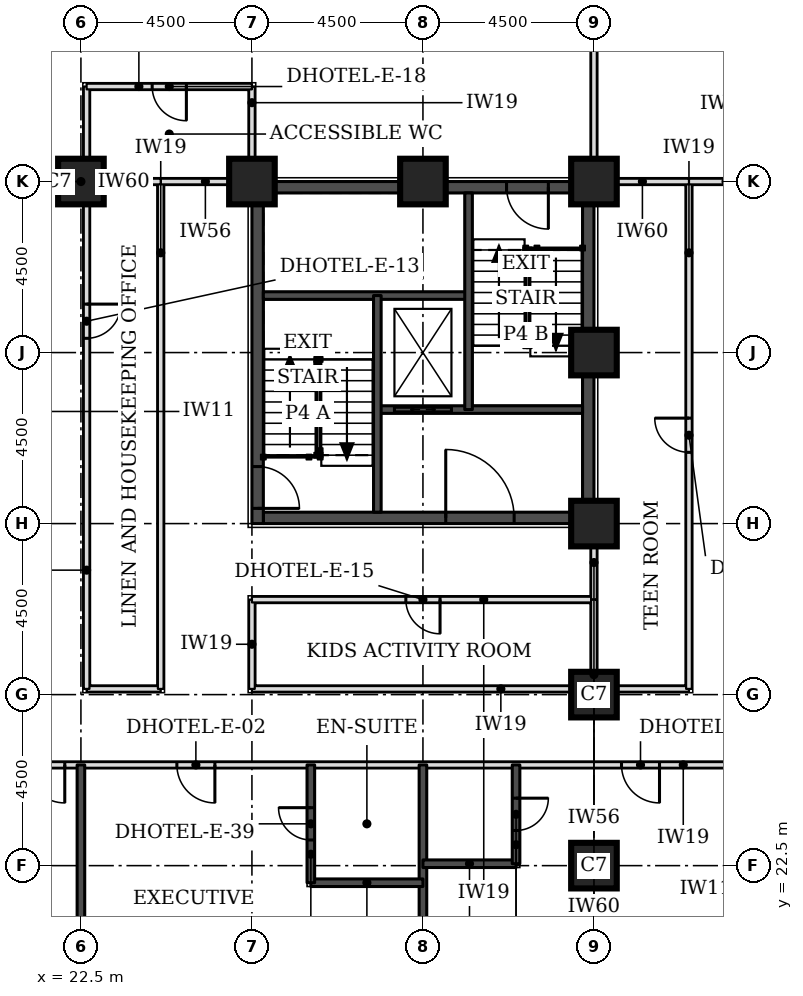
"""IFC4 building model, lengths in metres.
Left out: names, types, materials, properties, quantities, classifications, styles, units other than length and angle.
Written with IfcOpenShell. Run it as: python <this file> out.ifc"""

import sys

from ifc_helpers import new_model, si_unit, direction, frame, frame_2d, origin, origin_2d, place, context, subcontext, project, spatial, rectangle, extrude, element, fill, save


model = new_model("IFC4")
c1 = context("Model", 3, precision=1e-05, world=origin(), true_north=direction((0.0, 1.0)))
c2 = subcontext(c1, "Body", "Model", "MODEL_VIEW")
j1 = project(units=[si_unit("LENGTHUNIT", "METRE"), si_unit("PLANEANGLEUNIT", "RADIAN")], contexts=[c1])
p1 = place(None, origin())
s1 = spatial("IfcSite", under=j1, at=p1, CompositionType="ELEMENT")
p2 = place(p1, origin())
s2 = spatial("IfcBuilding", under=s1, at=p2, CompositionType="ELEMENT")
p3 = place(p2, frame((0.0, 0.0, 62.7)))
s3 = spatial("IfcBuildingStorey", under=s2, at=p3, CompositionType="ELEMENT", Elevation=62.7)
for number, where, z_axis, x_axis in (
    (1, (36.0, 22.5, 0.0), (0.0, 0.0, 1.0), (1.0, 0.0, 0.0)),
    (2, (36.0, 27.0, 0.0), (0.0, 0.0, 1.0), (1.0, 0.0, 0.0)),
    (3, (36.0, 31.5, 0.0), (0.0, 0.0, 1.0), (1.0, 0.0, 0.0)),
    (4, (36.0, 36.0, 0.0), (0.0, 0.0, 1.0), (1.0, 0.0, 0.0)),
    (5, (22.5, 40.5, 0.0), (0.0, 0.0, 1.0), (1.0, 0.0, 0.0)),
    (6, (27.0, 40.5, 0.0), (0.0, 0.0, 1.0), (1.0, 0.0, 0.0)),
    (7, (31.5, 40.5, 0.0), (0.0, 0.0, 1.0), (1.0, 0.0, 0.0)),
    (8, (36.0, 40.5, 0.0), (0.0, 0.0, 1.0), (1.0, 0.0, 0.0)),
):
    element("IfcColumn", number, at=place(p3, frame(where, z_axis=z_axis, x_axis=x_axis)), inside=s3, PredefinedType="COLUMN", context=c2, shape_type="SweptSolid", body=[
        extrude(rectangle(XDim=1.2, YDim=1.2, at=origin_2d()), origin(), (0.0, 0.0, 1.0), 3.3),
    ])
p4 = place(p3, frame((27.3, 31.65, 0.0), z_axis=(0.0, 0.0, 1.0), x_axis=(1.0, 0.0, 0.0)))
e9 = element("IfcWall", 9, at=p4, inside=s3, PredefinedType="SHEAR", context=c2, shape_type="SweptSolid", body=[
    extrude(rectangle(XDim=8.4, YDim=0.3, at=frame_2d((4.2, 0.0))), origin(), (0.0, 0.0, 1.0), 3.3),
])
p5 = place(p4, frame((4.8, 0.0, 0.0)))
e10 = element("IfcOpeningElement", 10, at=p5, cuts=e9, PredefinedType="OPENING", context=c2, shape_type="SweptSolid", body=[
    extrude(rectangle(XDim=1.8, YDim=2.1, at=frame_2d((0.9, 1.05))), frame((0.0, 0.16, 0.0), z_axis=(0.0, -1.0, 0.0), x_axis=(1.0, 0.0, 0.0)), (0.0, 0.0, 1.0), 0.32),
])
p6 = place(p3, frame((27.3, 40.35, 0.0), z_axis=(0.0, 0.0, 1.0), x_axis=(1.0, 0.0, 0.0)))
e11 = element("IfcWall", 11, at=p6, inside=s3, PredefinedType="SHEAR", context=c2, shape_type="SweptSolid", body=[
    extrude(rectangle(XDim=8.4, YDim=0.3, at=frame_2d((4.2, 0.0))), origin(), (0.0, 0.0, 1.0), 3.3),
])
p7 = place(p6, frame((6.4, 0.0, 0.0)))
e12 = element("IfcOpeningElement", 12, at=p7, cuts=e11, PredefinedType="OPENING", context=c2, shape_type="SweptSolid", body=[
    extrude(rectangle(XDim=1.1, YDim=2.1, at=frame_2d((0.55, 1.05))), frame((0.0, 0.16, 0.0), z_axis=(0.0, -1.0, 0.0), x_axis=(1.0, 0.0, 0.0)), (0.0, 0.0, 1.0), 0.32),
])
p8 = place(p3, frame((27.15, 31.5, 0.0), z_axis=(0.0, 0.0, 1.0), x_axis=(0.0, 1.0, 0.0)))
e13 = element("IfcWall", 13, at=p8, inside=s3, PredefinedType="SHEAR", context=c2, shape_type="SweptSolid", body=[
    extrude(rectangle(XDim=9.0, YDim=0.3, at=frame_2d((4.5, 0.0))), origin(), (0.0, 0.0, 1.0), 3.3),
])
p9 = place(p8, frame((0.4, 0.0, 0.0)))
e14 = element("IfcOpeningElement", 14, at=p9, cuts=e13, PredefinedType="OPENING", context=c2, shape_type="SweptSolid", body=[
    extrude(rectangle(XDim=1.1, YDim=2.1, at=frame_2d((0.55, 1.05))), frame((0.0, 0.16, 0.0), z_axis=(0.0, -1.0, 0.0), x_axis=(1.0, 0.0, 0.0)), (0.0, 0.0, 1.0), 0.32),
])
p10 = place(p3, frame((35.85, 31.5, 0.0), z_axis=(0.0, 0.0, 1.0), x_axis=(0.0, 1.0, 0.0)))
e15 = element("IfcWall", 15, at=p10, inside=s3, PredefinedType="SHEAR", context=c2, shape_type="SweptSolid", body=[
    extrude(rectangle(XDim=9.0, YDim=0.3, at=frame_2d((4.5, 0.0))), origin(), (0.0, 0.0, 1.0), 3.3),
])
p11 = place(p3, frame((20.65, 25.15, 0.0), z_axis=(0.0, 0.0, 1.0), x_axis=(1.0, 0.0, 0.0)))
e16 = element("IfcWall", 16, at=p11, inside=s3, PredefinedType="PARTITIONING", context=c2, shape_type="SweptSolid", body=[
    extrude(rectangle(XDim=32.2, YDim=0.15, at=frame_2d((16.1, 0.0))), origin(), (0.0, 0.0, 1.0), 3.08),
])
p12 = place(p11, frame((4.375, 0.0, 0.0)))
e17 = element("IfcOpeningElement", 17, at=p12, cuts=e16, PredefinedType="OPENING", context=c2, shape_type="SweptSolid", body=[
    extrude(rectangle(XDim=1.0, YDim=2.1, at=frame_2d((0.5, 1.05))), frame((0.0, 0.085, 0.0), z_axis=(0.0, -1.0, 0.0), x_axis=(1.0, 0.0, 0.0)), (0.0, 0.0, 1.0), 0.17),
])
p13 = place(p11, frame((16.075, 0.0, 0.0)))
e18 = element("IfcOpeningElement", 18, at=p13, cuts=e16, PredefinedType="OPENING", context=c2, shape_type="SweptSolid", body=[
    extrude(rectangle(XDim=1.0, YDim=2.1, at=frame_2d((0.5, 1.05))), frame((0.0, 0.085, 0.0), z_axis=(0.0, -1.0, 0.0), x_axis=(1.0, 0.0, 0.0)), (0.0, 0.0, 1.0), 0.17),
])
p14 = place(p11, frame((22.375, 0.0, 0.0)))
e19 = element("IfcOpeningElement", 19, at=p14, cuts=e16, PredefinedType="OPENING", context=c2, shape_type="SweptSolid", body=[
    extrude(rectangle(XDim=1.0, YDim=2.1, at=frame_2d((0.5, 1.05))), frame((0.0, 0.085, 0.0), z_axis=(0.0, -1.0, 0.0), x_axis=(1.0, 0.0, 0.0)), (0.0, 0.0, 1.0), 0.17),
])
p15 = place(p11, frame((0.425, 0.0, 0.0)))
e20 = element("IfcOpeningElement", 20, at=p15, cuts=e16, PredefinedType="OPENING", context=c2, shape_type="SweptSolid", body=[
    extrude(rectangle(XDim=1.0, YDim=2.1, at=frame_2d((0.5, 1.05))), frame((0.0, 0.085, 0.0), z_axis=(0.0, -1.0, 0.0), x_axis=(1.0, 0.0, 0.0)), (0.0, 0.0, 1.0), 0.17),
])
p16 = place(p11, frame((30.025, 0.0, 0.0)))
e21 = element("IfcOpeningElement", 21, at=p16, cuts=e16, PredefinedType="OPENING", context=c2, shape_type="SweptSolid", body=[
    extrude(rectangle(XDim=1.0, YDim=2.1, at=frame_2d((0.5, 1.05))), frame((0.0, 0.085, 0.0), z_axis=(0.0, -1.0, 0.0), x_axis=(1.0, 0.0, 0.0)), (0.0, 0.0, 1.0), 0.17),
])
p17 = place(p3, frame((22.65, 27.15, 0.0), z_axis=(0.0, 0.0, 1.0), x_axis=(1.0, 0.0, 0.0)))
e22 = element("IfcWall", 22, at=p17, inside=s3, PredefinedType="PARTITIONING", context=c2, shape_type="SweptSolid", body=[
    extrude(rectangle(XDim=1.95, YDim=0.15, at=frame_2d((0.975, 0.0))), origin(), (0.0, 0.0, 1.0), 3.08),
])
p18 = place(p3, frame((22.65, 27.15, 0.0), z_axis=(0.0, 0.0, 1.0), x_axis=(0.0, 1.0, 0.0)))
e23 = element("IfcWall", 23, at=p18, inside=s3, PredefinedType="PARTITIONING", context=c2, shape_type="SweptSolid", body=[
    extrude(rectangle(XDim=15.85, YDim=0.15, at=frame_2d((7.925, 0.0))), origin(), (0.0, 0.0, 1.0), 3.08),
])
p19 = place(p18, frame((9.225, 0.0, 0.0)))
e24 = element("IfcOpeningElement", 24, at=p19, cuts=e23, PredefinedType="OPENING", context=c2, shape_type="SweptSolid", body=[
    extrude(rectangle(XDim=0.9, YDim=2.1, at=frame_2d((0.45, 1.05))), frame((0.0, 0.085, 0.0), z_axis=(0.0, -1.0, 0.0), x_axis=(1.0, 0.0, 0.0)), (0.0, 0.0, 1.0), 0.17),
])
p20 = place(p3, frame((24.6, 27.15, 0.0), z_axis=(0.0, 0.0, 1.0), x_axis=(0.0, 1.0, 0.0)))
e25 = element("IfcWall", 25, at=p20, inside=s3, PredefinedType="PARTITIONING", context=c2, shape_type="SweptSolid", body=[
    extrude(rectangle(XDim=13.35, YDim=0.15, at=frame_2d((6.675, 0.0))), origin(), (0.0, 0.0, 1.0), 3.08),
])
p21 = place(p3, frame((27.0, 27.15, 0.0), z_axis=(0.0, 0.0, 1.0), x_axis=(1.0, 0.0, 0.0)))
e26 = element("IfcWall", 26, at=p21, inside=s3, PredefinedType="PARTITIONING", context=c2, shape_type="SweptSolid", body=[
    extrude(rectangle(XDim=11.5, YDim=0.15, at=frame_2d((5.75, 0.0))), origin(), (0.0, 0.0, 1.0), 3.08),
])
p22 = place(p3, frame((27.0, 27.15, 0.0), z_axis=(0.0, 0.0, 1.0), x_axis=(0.0, 1.0, 0.0)))
e27 = element("IfcWall", 27, at=p22, inside=s3, PredefinedType="PARTITIONING", context=c2, shape_type="SweptSolid", body=[
    extrude(rectangle(XDim=2.35, YDim=0.15, at=frame_2d((1.175, 0.0))), origin(), (0.0, 0.0, 1.0), 3.08),
])
p23 = place(p3, frame((38.5, 27.15, 0.0), z_axis=(0.0, 0.0, 1.0), x_axis=(0.0, 1.0, 0.0)))
e28 = element("IfcWall", 28, at=p23, inside=s3, PredefinedType="PARTITIONING", context=c2, shape_type="SweptSolid", body=[
    extrude(rectangle(XDim=13.35, YDim=0.15, at=frame_2d((6.675, 0.0))), origin(), (0.0, 0.0, 1.0), 3.08),
])
p24 = place(p23, frame((6.225, 0.0, 0.0)))
e29 = element("IfcOpeningElement", 29, at=p24, cuts=e28, PredefinedType="OPENING", context=c2, shape_type="SweptSolid", body=[
    extrude(rectangle(XDim=0.9, YDim=2.1, at=frame_2d((0.45, 1.05))), frame((0.0, 0.085, 0.0), z_axis=(0.0, -1.0, 0.0), x_axis=(1.0, 0.0, 0.0)), (0.0, 0.0, 1.0), 0.17),
])
p25 = place(p3, frame((27.0, 29.5, 0.0), z_axis=(0.0, 0.0, 1.0), x_axis=(1.0, 0.0, 0.0)))
e30 = element("IfcWall", 30, at=p25, inside=s3, PredefinedType="PARTITIONING", context=c2, shape_type="SweptSolid", body=[
    extrude(rectangle(XDim=9.0, YDim=0.15, at=frame_2d((4.5, 0.0))), origin(), (0.0, 0.0, 1.0), 3.08),
])
p26 = place(p25, frame((4.05, 0.0, 0.0)))
e31 = element("IfcOpeningElement", 31, at=p26, cuts=e30, PredefinedType="OPENING", context=c2, shape_type="SweptSolid", body=[
    extrude(rectangle(XDim=0.9, YDim=2.1, at=frame_2d((0.45, 1.05))), frame((0.0, 0.085, 0.0), z_axis=(0.0, -1.0, 0.0), x_axis=(1.0, 0.0, 0.0)), (0.0, 0.0, 1.0), 0.17),
])
p27 = place(p3, frame((36.0, 29.5, 0.0), z_axis=(0.0, 0.0, 1.0), x_axis=(0.0, 1.0, 0.0)))
e32 = element("IfcWall", 32, at=p27, inside=s3, PredefinedType="PARTITIONING", context=c2, shape_type="SweptSolid", body=[
    extrude(rectangle(XDim=1.95, YDim=0.15, at=frame_2d((0.975, 0.0))), origin(), (0.0, 0.0, 1.0), 2.33),
])
p28 = place(p3, frame((24.6, 40.5, 0.0), z_axis=(0.0, 0.0, 1.0), x_axis=(1.0, 0.0, 0.0)))
e33 = element("IfcWall", 33, at=p28, inside=s3, PredefinedType="PARTITIONING", context=c2, shape_type="SweptSolid", body=[
    extrude(rectangle(XDim=2.35, YDim=0.15, at=frame_2d((1.175, 0.0))), origin(), (0.0, 0.0, 1.0), 2.33),
])
p29 = place(p3, frame((38.5, 40.5, 0.0), z_axis=(0.0, 0.0, 1.0), x_axis=(1.0, 0.0, 0.0)))
e34 = element("IfcWall", 34, at=p29, inside=s3, PredefinedType="PARTITIONING", context=c2, shape_type="SweptSolid", body=[
    extrude(rectangle(XDim=1.95, YDim=0.15, at=frame_2d((0.975, 0.0))), origin(), (0.0, 0.0, 1.0), 2.33),
])
p30 = place(p3, frame((27.0, 40.55, 0.0), z_axis=(0.0, 0.0, 1.0), x_axis=(0.0, 1.0, 0.0)))
e35 = element("IfcWall", 35, at=p30, inside=s3, PredefinedType="PARTITIONING", context=c2, shape_type="SweptSolid", body=[
    extrude(rectangle(XDim=2.45, YDim=0.15, at=frame_2d((1.225, 0.0))), origin(), (0.0, 0.0, 1.0), 3.08),
])
p31 = place(p3, frame((36.0, 40.55, 0.0), z_axis=(0.0, 0.0, 1.0), x_axis=(0.0, 1.0, 0.0)))
e36 = element("IfcWall", 36, at=p31, inside=s3, PredefinedType="PARTITIONING", context=c2, shape_type="SweptSolid", body=[
    extrude(rectangle(XDim=4.4, YDim=0.15, at=frame_2d((2.2, 0.0))), origin(), (0.0, 0.0, 1.0), 2.33),
])
p32 = place(p3, frame((22.65, 43.0, 0.0), z_axis=(0.0, 0.0, 1.0), x_axis=(1.0, 0.0, 0.0)))
e37 = element("IfcWall", 37, at=p32, inside=s3, PredefinedType="PARTITIONING", context=c2, shape_type="SweptSolid", body=[
    extrude(rectangle(XDim=4.35, YDim=0.15, at=frame_2d((2.175, 0.0))), origin(), (0.0, 0.0, 1.0), 3.08),
])
p33 = place(p32, frame((1.725, 0.0, 0.0)))
e38 = element("IfcOpeningElement", 38, at=p33, cuts=e37, PredefinedType="OPENING", context=c2, shape_type="SweptSolid", body=[
    extrude(rectangle(XDim=0.9, YDim=2.1, at=frame_2d((0.45, 1.05))), frame((0.0, 0.085, 0.0), z_axis=(0.0, -1.0, 0.0), x_axis=(1.0, 0.0, 0.0)), (0.0, 0.0, 1.0), 0.17),
])
for number, where, z_axis, x_axis in (
    (39, (22.5, 18.6, 0.0), (0.0, 0.0, 1.0), (0.0, 1.0, 0.0)),
    (40, (31.5, 18.6, 0.0), (0.0, 0.0, 1.0), (0.0, 1.0, 0.0)),
):
    element("IfcWall", number, at=place(p3, frame(where, z_axis=z_axis, x_axis=x_axis)), inside=s3, PredefinedType="SOLIDWALL", context=c2, shape_type="SweptSolid", body=[
        extrude(rectangle(XDim=6.55, YDim=0.2, at=frame_2d((3.275, 0.0))), origin(), (0.0, 0.0, 1.0), 3.08),
    ])
p34 = place(p3, frame((28.55, 22.05, 0.0), z_axis=(0.0, 0.0, 1.0), x_axis=(1.0, 0.0, 0.0)))
e41 = element("IfcWall", 41, at=p34, inside=s3, PredefinedType="SOLIDWALL", context=c2, shape_type="SweptSolid", body=[
    extrude(rectangle(XDim=2.95, YDim=0.2, at=frame_2d((1.475, 0.0))), origin(), (0.0, 0.0, 1.0), 3.08),
])
p35 = place(p3, frame((28.55, 22.05, 0.0), z_axis=(0.0, 0.0, 1.0), x_axis=(0.0, 1.0, 0.0)))
e42 = element("IfcWall", 42, at=p35, inside=s3, PredefinedType="SOLIDWALL", context=c2, shape_type="SweptSolid", body=[
    extrude(rectangle(XDim=3.1, YDim=0.2, at=frame_2d((1.55, 0.0))), origin(), (0.0, 0.0, 1.0), 3.08),
])
p36 = place(p35, frame((1.125, 0.0, 0.0)))
e43 = element("IfcOpeningElement", 43, at=p36, cuts=e42, PredefinedType="OPENING", context=c2, shape_type="SweptSolid", body=[
    extrude(rectangle(XDim=0.85, YDim=2.1, at=frame_2d((0.425, 1.05))), frame((0.0, 0.11, 0.0), z_axis=(0.0, -1.0, 0.0), x_axis=(1.0, 0.0, 0.0)), (0.0, 0.0, 1.0), 0.22),
])
p37 = place(p3, frame((31.5, 22.55, 0.0), z_axis=(0.0, 0.0, 1.0), x_axis=(1.0, 0.0, 0.0)))
e44 = element("IfcWall", 44, at=p37, inside=s3, PredefinedType="SOLIDWALL", context=c2, shape_type="SweptSolid", body=[
    extrude(rectangle(XDim=2.45, YDim=0.2, at=frame_2d((1.225, 0.0))), origin(), (0.0, 0.0, 1.0), 3.08),
])
p38 = place(p3, frame((33.95, 22.55, 0.0), z_axis=(0.0, 0.0, 1.0), x_axis=(0.0, 1.0, 0.0)))
e45 = element("IfcWall", 45, at=p38, inside=s3, PredefinedType="SOLIDWALL", context=c2, shape_type="SweptSolid", body=[
    extrude(rectangle(XDim=2.6, YDim=0.2, at=frame_2d((1.3, 0.0))), origin(), (0.0, 0.0, 1.0), 3.08),
])
p39 = place(p38, frame((0.875, 0.0, 0.0)))
e46 = element("IfcOpeningElement", 46, at=p39, cuts=e45, PredefinedType="OPENING", context=c2, shape_type="SweptSolid", body=[
    extrude(rectangle(XDim=0.85, YDim=2.1, at=frame_2d((0.425, 1.05))), frame((0.0, 0.11, 0.0), z_axis=(0.0, -1.0, 0.0), x_axis=(1.0, 0.0, 0.0)), (0.0, 0.0, 1.0), 0.22),
])
p40 = place(p3, frame((36.0, 27.15, 0.0), z_axis=(0.0, 0.0, 1.0), x_axis=(0.0, 1.0, 0.0)))
e47 = element("IfcWall", 47, at=p40, inside=s3, PredefinedType="PARTITIONING", context=c2, shape_type="SweptSolid", body=[
    extrude(rectangle(XDim=2.35, YDim=0.15, at=frame_2d((1.175, 0.0))), origin(), (0.0, 0.0, 1.0), 2.33),
])
p41 = place(p3, frame((22.65, 40.5, 0.0), z_axis=(0.0, 0.0, 1.0), x_axis=(1.0, 0.0, 0.0)))
e48 = element("IfcWall", 48, at=p41, inside=s3, PredefinedType="PARTITIONING", context=c2, shape_type="SweptSolid", body=[
    extrude(rectangle(XDim=1.95, YDim=0.15, at=frame_2d((0.975, 0.0))), origin(), (0.0, 0.0, 1.0), 2.33),
])
p42 = place(p3, frame((36.05, 40.5, 0.0), z_axis=(0.0, 0.0, 1.0), x_axis=(1.0, 0.0, 0.0)))
e49 = element("IfcWall", 49, at=p42, inside=s3, PredefinedType="PARTITIONING", context=c2, shape_type="SweptSolid", body=[
    extrude(rectangle(XDim=2.45, YDim=0.15, at=frame_2d((1.225, 0.0))), origin(), (0.0, 0.0, 1.0), 2.33),
])
p43 = place(p3, frame((30.3, 34.5, 0.0), z_axis=(0.0, 0.0, 1.0), x_axis=(1.0, 0.0, 0.0)))
e50 = element("IfcWall", 50, at=p43, inside=s3, PredefinedType="SOLIDWALL", context=c2, shape_type="SweptSolid", body=[
    extrude(rectangle(XDim=5.4, YDim=0.2, at=frame_2d((2.7, 0.0))), origin(), (0.0, 0.0, 1.0), 3.08),
])
p44 = place(p43, frame((0.45, 0.0, 0.0)))
e51 = element("IfcOpeningElement", 51, at=p44, cuts=e50, PredefinedType="OPENING", context=c2, shape_type="SweptSolid", body=[
    extrude(rectangle(XDim=1.5, YDim=2.1, at=frame_2d((0.75, 1.05))), frame((0.0, 0.11, 0.0), z_axis=(0.0, -1.0, 0.0), x_axis=(1.0, 0.0, 0.0)), (0.0, 0.0, 1.0), 0.22),
])
p45 = place(p3, frame((27.3, 37.5, 0.0), z_axis=(0.0, 0.0, 1.0), x_axis=(1.0, 0.0, 0.0)))
e52 = element("IfcWall", 52, at=p45, inside=s3, PredefinedType="SOLIDWALL", context=c2, shape_type="SweptSolid", body=[
    extrude(rectangle(XDim=5.4, YDim=0.2, at=frame_2d((2.7, 0.0))), origin(), (0.0, 0.0, 1.0), 3.08),
])
for number, where, z_axis, x_axis in (
    (53, (30.3, 31.8, 0.0), (0.0, 0.0, 1.0), (0.0, 1.0, 0.0)),
    (54, (32.7, 34.5, 0.0), (0.0, 0.0, 1.0), (0.0, 1.0, 0.0)),
):
    element("IfcWall", number, at=place(p3, frame(where, z_axis=z_axis, x_axis=x_axis)), inside=s3, PredefinedType="SOLIDWALL", context=c2, shape_type="SweptSolid", body=[
        extrude(rectangle(XDim=5.7, YDim=0.2, at=frame_2d((2.85, 0.0))), origin(), (0.0, 0.0, 1.0), 3.08),
    ])
p46 = place(p12, frame((1.0, 0.0, 0.0), z_axis=(0.0, 0.0, 1.0), x_axis=(-1.0, 0.0, 0.0)))
e55 = element("IfcDoor", 55, at=p46, inside=s3, OperationType="SINGLE_SWING_LEFT", PredefinedType="DOOR", context=c2, shape_type="SweptSolid", body=[
    extrude(rectangle(XDim=1.0, YDim=2.1, at=frame_2d((0.5, 1.05))), frame((0.0, 0.025, 0.0), z_axis=(0.0, -1.0, 0.0), x_axis=(1.0, 0.0, 0.0)), (0.0, 0.0, 1.0), 0.05),
])
fill(e17, e55)
p47 = place(p36, origin())
e56 = element("IfcDoor", 56, at=p47, inside=s3, OperationType="SINGLE_SWING_RIGHT", PredefinedType="DOOR", context=c2, shape_type="SweptSolid", body=[
    extrude(rectangle(XDim=0.85, YDim=2.1, at=frame_2d((0.425, 1.05))), frame((0.0, 0.025, 0.0), z_axis=(0.0, -1.0, 0.0), x_axis=(1.0, 0.0, 0.0)), (0.0, 0.0, 1.0), 0.05),
])
fill(e43, e56)
p48 = place(p13, frame((1.0, 0.0, 0.0), z_axis=(0.0, 0.0, 1.0), x_axis=(-1.0, 0.0, 0.0)))
e57 = element("IfcDoor", 57, at=p48, inside=s3, OperationType="SINGLE_SWING_LEFT", PredefinedType="DOOR", context=c2, shape_type="SweptSolid", body=[
    extrude(rectangle(XDim=1.0, YDim=2.1, at=frame_2d((0.5, 1.05))), frame((0.0, 0.025, 0.0), z_axis=(0.0, -1.0, 0.0), x_axis=(1.0, 0.0, 0.0)), (0.0, 0.0, 1.0), 0.05),
])
fill(e18, e57)
p49 = place(p39, frame((0.85, 0.0, 0.0), z_axis=(0.0, 0.0, 1.0), x_axis=(-1.0, 0.0, 0.0)))
e58 = element("IfcDoor", 58, at=p49, inside=s3, OperationType="SINGLE_SWING_LEFT", PredefinedType="DOOR", context=c2, shape_type="SweptSolid", body=[
    extrude(rectangle(XDim=0.85, YDim=2.1, at=frame_2d((0.425, 1.05))), frame((0.0, 0.025, 0.0), z_axis=(0.0, -1.0, 0.0), x_axis=(1.0, 0.0, 0.0)), (0.0, 0.0, 1.0), 0.05),
])
fill(e46, e58)
p50 = place(p15, frame((1.0, 0.0, 0.0), z_axis=(0.0, 0.0, 1.0), x_axis=(-1.0, 0.0, 0.0)))
e59 = element("IfcDoor", 59, at=p50, inside=s3, OperationType="SINGLE_SWING_LEFT", PredefinedType="DOOR", context=c2, shape_type="SweptSolid", body=[
    extrude(rectangle(XDim=1.0, YDim=2.1, at=frame_2d((0.5, 1.05))), frame((0.0, 0.025, 0.0), z_axis=(0.0, -1.0, 0.0), x_axis=(1.0, 0.0, 0.0)), (0.0, 0.0, 1.0), 0.05),
])
fill(e20, e59)
p51 = place(p19, frame((0.9, 0.0, 0.0), z_axis=(0.0, 0.0, 1.0), x_axis=(-1.0, 0.0, 0.0)))
e60 = element("IfcDoor", 60, at=p51, inside=s3, OperationType="SINGLE_SWING_LEFT", PredefinedType="DOOR", context=c2, shape_type="SweptSolid", body=[
    extrude(rectangle(XDim=0.9, YDim=2.1, at=frame_2d((0.45, 1.05))), frame((0.0, 0.025, 0.0), z_axis=(0.0, -1.0, 0.0), x_axis=(1.0, 0.0, 0.0)), (0.0, 0.0, 1.0), 0.05),
])
fill(e24, e60)
p52 = place(p26, frame((0.9, 0.0, 0.0), z_axis=(0.0, 0.0, 1.0), x_axis=(-1.0, 0.0, 0.0)))
e61 = element("IfcDoor", 61, at=p52, inside=s3, OperationType="SINGLE_SWING_LEFT", PredefinedType="DOOR", context=c2, shape_type="SweptSolid", body=[
    extrude(rectangle(XDim=0.9, YDim=2.1, at=frame_2d((0.45, 1.05))), frame((0.0, 0.025, 0.0), z_axis=(0.0, -1.0, 0.0), x_axis=(1.0, 0.0, 0.0)), (0.0, 0.0, 1.0), 0.05),
])
fill(e31, e61)
p53 = place(p24, origin())
e62 = element("IfcDoor", 62, at=p53, inside=s3, OperationType="SINGLE_SWING_RIGHT", PredefinedType="DOOR", context=c2, shape_type="SweptSolid", body=[
    extrude(rectangle(XDim=0.9, YDim=2.1, at=frame_2d((0.45, 1.05))), frame((0.0, 0.025, 0.0), z_axis=(0.0, -1.0, 0.0), x_axis=(1.0, 0.0, 0.0)), (0.0, 0.0, 1.0), 0.05),
])
fill(e29, e62)
p54 = place(p33, frame((0.9, 0.0, 0.0), z_axis=(0.0, 0.0, 1.0), x_axis=(-1.0, 0.0, 0.0)))
e63 = element("IfcDoor", 63, at=p54, inside=s3, OperationType="SINGLE_SWING_LEFT", PredefinedType="DOOR", context=c2, shape_type="SweptSolid", body=[
    extrude(rectangle(XDim=0.9, YDim=2.1, at=frame_2d((0.45, 1.05))), frame((0.0, 0.025, 0.0), z_axis=(0.0, -1.0, 0.0), x_axis=(1.0, 0.0, 0.0)), (0.0, 0.0, 1.0), 0.05),
])
fill(e38, e63)
p55 = place(p9, frame((1.1, 0.0, 0.0), z_axis=(0.0, 0.0, 1.0), x_axis=(-1.0, 0.0, 0.0)))
e64 = element("IfcDoor", 64, at=p55, inside=s3, OperationType="SINGLE_SWING_RIGHT", PredefinedType="DOOR", context=c2, shape_type="SweptSolid", body=[
    extrude(rectangle(XDim=1.1, YDim=2.1, at=frame_2d((0.55, 1.05))), frame((0.0, 0.025, 0.0), z_axis=(0.0, -1.0, 0.0), x_axis=(1.0, 0.0, 0.0)), (0.0, 0.0, 1.0), 0.05),
])
fill(e14, e64)
p56 = place(p7, frame((1.1, 0.0, 0.0), z_axis=(0.0, 0.0, 1.0), x_axis=(-1.0, 0.0, 0.0)))
e65 = element("IfcDoor", 65, at=p56, inside=s3, OperationType="SINGLE_SWING_LEFT", PredefinedType="DOOR", context=c2, shape_type="SweptSolid", body=[
    extrude(rectangle(XDim=1.1, YDim=2.1, at=frame_2d((0.55, 1.05))), frame((0.0, 0.025, 0.0), z_axis=(0.0, -1.0, 0.0), x_axis=(1.0, 0.0, 0.0)), (0.0, 0.0, 1.0), 0.05),
])
fill(e12, e65)
p57 = place(p44, origin())
e66 = element("IfcDoor", 66, at=p57, inside=s3, OperationType="DOUBLE_DOOR_SLIDING", PredefinedType="DOOR", context=c2, shape_type="SweptSolid", body=[
    extrude(rectangle(XDim=1.5, YDim=2.1, at=frame_2d((0.75, 1.05))), frame((0.0, 0.025, 0.0), z_axis=(0.0, -1.0, 0.0), x_axis=(1.0, 0.0, 0.0)), (0.0, 0.0, 1.0), 0.05),
])
fill(e51, e66)
p58 = place(p5, origin())
e67 = element("IfcDoor", 67, at=p58, inside=s3, OperationType="SINGLE_SWING_LEFT", PredefinedType="DOOR", context=c2, shape_type="SweptSolid", body=[
    extrude(rectangle(XDim=1.8, YDim=2.1, at=frame_2d((0.9, 1.05))), frame((0.0, 0.025, 0.0), z_axis=(0.0, -1.0, 0.0), x_axis=(1.0, 0.0, 0.0)), (0.0, 0.0, 1.0), 0.05),
])
fill(e10, e67)
save(model, sys.argv[1])
